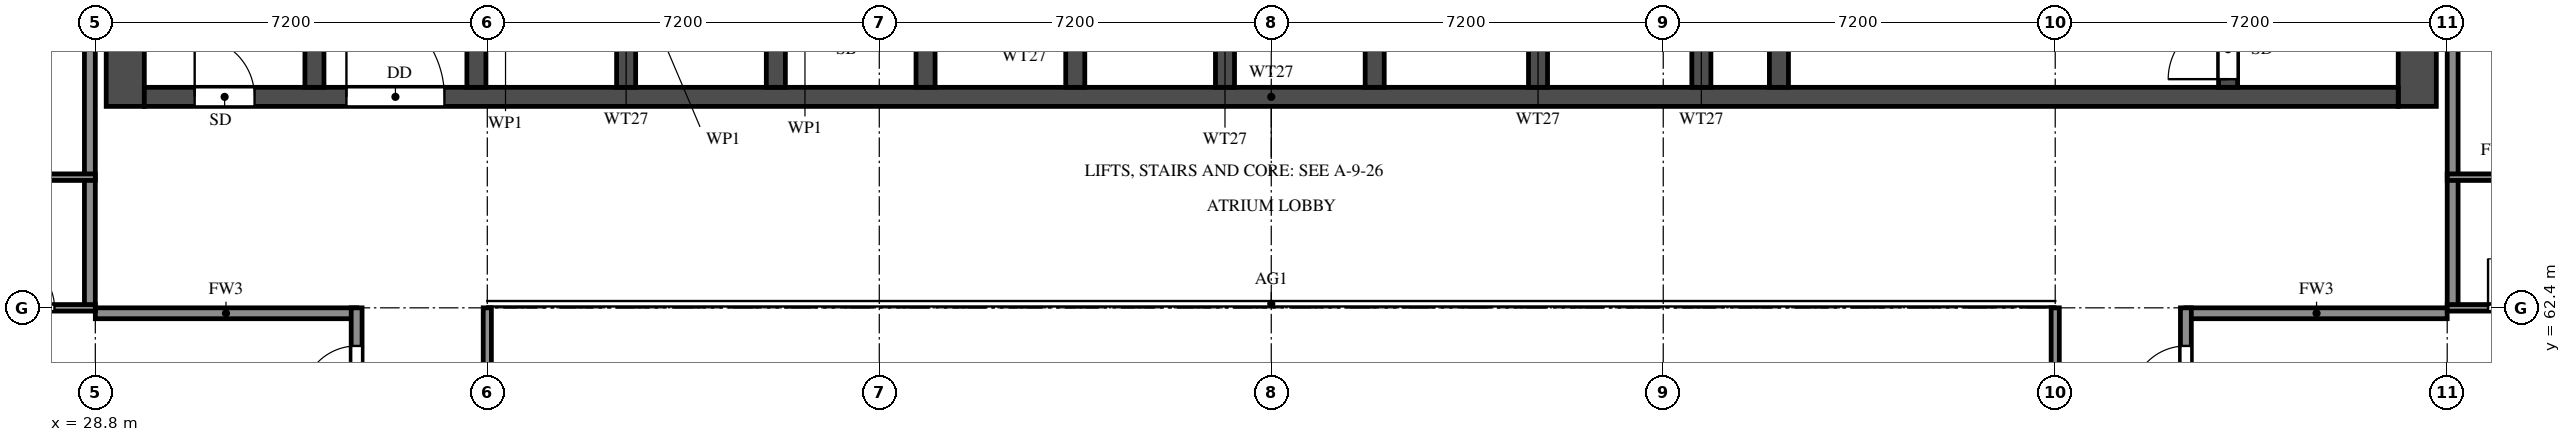
"""IFC4 building model, lengths in metres.
Left out: names, types, materials, properties, quantities, classifications, styles, units other than length and angle.
Written with IfcOpenShell. Run it as: python <this file> out.ifc"""

import sys

from ifc_helpers import new_model, si_unit, direction, frame, frame_2d, origin, place, context, subcontext, project, spatial, rectangle, extrude, element, fill, save


model = new_model("IFC4")
c1 = context("Model", 3, precision=1e-05, world=origin(), true_north=direction((0.0, 1.0)))
c2 = subcontext(c1, "Body", "Model", "MODEL_VIEW")
j1 = project(units=[si_unit("LENGTHUNIT", "METRE"), si_unit("PLANEANGLEUNIT", "RADIAN")], contexts=[c1])
p1 = place(None, origin())
s1 = spatial("IfcSite", under=j1, at=p1, CompositionType="ELEMENT")
p2 = place(p1, origin())
s2 = spatial("IfcBuilding", under=s1, at=p2, CompositionType="ELEMENT")
p3 = place(p2, frame((0.0, 0.0, 199.0)))
s3 = spatial("IfcBuildingStorey", under=s2, at=p3, CompositionType="ELEMENT", Elevation=199.0)
for number, where, z_axis, x_axis in (
    (1, (29.35, 66.1, 0.0), (0.0, 0.0, 1.0), (0.0, 1.0, 0.0)),
    (2, (71.45, 66.1, 0.0), (0.0, 0.0, 1.0), (0.0, 1.0, 0.0)),
):
    element("IfcWall", number, at=place(p3, frame(where, z_axis=z_axis, x_axis=x_axis)), inside=s3, PredefinedType="SHEAR", context=c2, shape_type="SweptSolid", body=[
        extrude(rectangle(XDim=11.9, YDim=0.7, at=frame_2d((5.95, 0.0))), origin(), (0.0, 0.0, 1.0), 3.2),
    ])
p4 = place(p3, frame((29.7, 66.275, 0.0), z_axis=(0.0, 0.0, 1.0), x_axis=(1.0, 0.0, 0.0)))
e3 = element("IfcWall", 3, at=p4, inside=s3, PredefinedType="SHEAR", context=c2, shape_type="SweptSolid", body=[
    extrude(rectangle(XDim=41.4, YDim=0.35, at=frame_2d((20.7, 0.0))), origin(), (0.0, 0.0, 1.0), 3.2),
])
p5 = place(p4, frame((0.925, 0.0, 0.0)))
e4 = element("IfcOpeningElement", 4, at=p5, cuts=e3, PredefinedType="OPENING", context=c2, shape_type="SweptSolid", body=[
    extrude(rectangle(XDim=1.1, YDim=2.1, at=frame_2d((0.55, 1.05))), frame((0.0, 0.185, 0.0), z_axis=(0.0, -1.0, 0.0), x_axis=(1.0, 0.0, 0.0)), (0.0, 0.0, 1.0), 0.37),
])
p6 = place(p4, frame((3.712, 0.0, 0.0)))
e5 = element("IfcOpeningElement", 5, at=p6, cuts=e3, PredefinedType="OPENING", context=c2, shape_type="SweptSolid", body=[
    extrude(rectangle(XDim=1.8, YDim=2.1, at=frame_2d((0.9, 1.05))), frame((0.0, 0.185, 0.0), z_axis=(0.0, -1.0, 0.0), x_axis=(1.0, 0.0, 0.0)), (0.0, 0.0, 1.0), 0.37),
])
p7 = place(p3, frame((32.825, 66.45, 0.0), z_axis=(0.0, 0.0, 1.0), x_axis=(0.0, 1.0, 0.0)))
e6 = element("IfcWall", 6, at=p7, inside=s3, PredefinedType="SHEAR", context=c2, shape_type="SweptSolid", body=[
    extrude(rectangle(XDim=10.85, YDim=0.35, at=frame_2d((5.425, 0.0))), origin(), (0.0, 0.0, 1.0), 3.2),
])
p8 = place(p3, frame((67.975, 66.45, 0.0), z_axis=(0.0, 0.0, 1.0), x_axis=(0.0, 1.0, 0.0)))
e7 = element("IfcWall", 7, at=p8, inside=s3, PredefinedType="SHEAR", context=c2, shape_type="SweptSolid", body=[
    extrude(rectangle(XDim=10.85, YDim=0.35, at=frame_2d((5.425, 0.0))), origin(), (0.0, 0.0, 1.0), 3.2),
])
p9 = place(p8, frame((0.15, 0.0, 0.0)))
e8 = element("IfcOpeningElement", 8, at=p9, cuts=e7, PredefinedType="OPENING", context=c2, shape_type="SweptSolid", body=[
    extrude(rectangle(XDim=1.1, YDim=2.1, at=frame_2d((0.55, 1.05))), frame((0.0, 0.185, 0.0), z_axis=(0.0, -1.0, 0.0), x_axis=(1.0, 0.0, 0.0)), (0.0, 0.0, 1.0), 0.37),
])
p10 = place(p3, frame((59.725, 66.45, 0.0), z_axis=(0.0, 0.0, 1.0), x_axis=(0.0, 1.0, 0.0)))
e9 = element("IfcWall", 9, at=p10, inside=s3, PredefinedType="SHEAR", context=c2, shape_type="SweptSolid", body=[
    extrude(rectangle(XDim=6.125, YDim=0.35, at=frame_2d((3.062, 0.0))), origin(), (0.0, 0.0, 1.0), 3.2),
])
p11 = place(p10, frame((3.85, 0.0, 0.0)))
e10 = element("IfcOpeningElement", 10, at=p11, cuts=e9, PredefinedType="OPENING", context=c2, shape_type="SweptSolid", body=[
    extrude(rectangle(XDim=1.2, YDim=2.1, at=frame_2d((0.6, 1.05))), frame((0.0, 0.185, 0.0), z_axis=(0.0, -1.0, 0.0), x_axis=(1.0, 0.0, 0.0)), (0.0, 0.0, 1.0), 0.37),
])
for number, where, z_axis, x_axis in (
    (11, (35.8, 66.45, 0.0), (0.0, 0.0, 1.0), (0.0, 1.0, 0.0)),
    (12, (38.55, 66.45, 0.0), (0.0, 0.0, 1.0), (0.0, 1.0, 0.0)),
    (13, (41.3, 66.45, 0.0), (0.0, 0.0, 1.0), (0.0, 1.0, 0.0)),
    (14, (44.05, 66.45, 0.0), (0.0, 0.0, 1.0), (0.0, 1.0, 0.0)),
    (15, (46.8, 66.45, 0.0), (0.0, 0.0, 1.0), (0.0, 1.0, 0.0)),
    (16, (49.55, 66.45, 0.0), (0.0, 0.0, 1.0), (0.0, 1.0, 0.0)),
    (17, (52.3, 66.45, 0.0), (0.0, 0.0, 1.0), (0.0, 1.0, 0.0)),
    (18, (55.3, 66.45, 0.0), (0.0, 0.0, 1.0), (0.0, 1.0, 0.0)),
    (19, (58.3, 66.45, 0.0), (0.0, 0.0, 1.0), (0.0, 1.0, 0.0)),
):
    element("IfcWall", number, at=place(p3, frame(where, z_axis=z_axis, x_axis=x_axis)), inside=s3, PredefinedType="SHEAR", context=c2, shape_type="SweptSolid", body=[
        extrude(rectangle(XDim=2.425, YDim=0.35, at=frame_2d((1.212, 0.0))), origin(), (0.0, 0.0, 1.0), 3.2),
    ])
for number, where, z_axis, x_axis in (
    (20, (28.8, 62.3, 0.0), (0.0, 0.0, 1.0), (1.0, 0.0, 0.0)),
    (21, (67.2, 62.3, 0.0), (0.0, 0.0, 1.0), (1.0, 0.0, 0.0)),
):
    element("IfcWall", number, at=place(p3, frame(where, z_axis=z_axis, x_axis=x_axis)), inside=s3, PredefinedType="SOLIDWALL", context=c2, shape_type="SweptSolid", body=[
        extrude(rectangle(XDim=4.8, YDim=0.2, at=frame_2d((2.4, 0.0))), origin(), (0.0, 0.0, 1.0), 3.2),
    ])
p12 = place(p3, frame((28.7, 62.4, 0.0), z_axis=(0.0, 0.0, 1.0), x_axis=(0.0, 1.0, 0.0)))
e22 = element("IfcWall", 22, at=p12, inside=s3, PredefinedType="SOLIDWALL", context=c2, shape_type="SweptSolid", body=[
    extrude(rectangle(XDim=15.6, YDim=0.2, at=frame_2d((7.8, 0.0))), origin(), (0.0, 0.0, 1.0), 3.2),
])
p13 = place(p3, frame((33.6, 45.6, 0.0), z_axis=(0.0, 0.0, 1.0), x_axis=(0.0, 1.0, 0.0)))
e23 = element("IfcWall", 23, at=p13, inside=s3, PredefinedType="SOLIDWALL", context=c2, shape_type="SweptSolid", body=[
    extrude(rectangle(XDim=16.8, YDim=0.2, at=frame_2d((8.4, 0.0))), origin(), (0.0, 0.0, 1.0), 3.2),
])
p14 = place(p13, frame((0.7, 0.0, 0.0)))
e24 = element("IfcOpeningElement", 24, at=p14, cuts=e23, PredefinedType="OPENING", context=c2, shape_type="SweptSolid", body=[
    extrude(rectangle(XDim=1.0, YDim=2.1, at=frame_2d((0.5, 1.05))), frame((0.0, 0.11, 0.0), z_axis=(0.0, -1.0, 0.0), x_axis=(1.0, 0.0, 0.0)), (0.0, 0.0, 1.0), 0.22),
])
p15 = place(p13, frame((8.3, 0.0, 0.0)))
e25 = element("IfcOpeningElement", 25, at=p15, cuts=e23, PredefinedType="OPENING", context=c2, shape_type="SweptSolid", body=[
    extrude(rectangle(XDim=1.0, YDim=2.1, at=frame_2d((0.5, 1.05))), frame((0.0, 0.11, 0.0), z_axis=(0.0, -1.0, 0.0), x_axis=(1.0, 0.0, 0.0)), (0.0, 0.0, 1.0), 0.22),
])
p16 = place(p13, frame((15.1, 0.0, 0.0)))
e26 = element("IfcOpeningElement", 26, at=p16, cuts=e23, PredefinedType="OPENING", context=c2, shape_type="SweptSolid", body=[
    extrude(rectangle(XDim=1.0, YDim=2.1, at=frame_2d((0.5, 1.05))), frame((0.0, 0.11, 0.0), z_axis=(0.0, -1.0, 0.0), x_axis=(1.0, 0.0, 0.0)), (0.0, 0.0, 1.0), 0.22),
])
p17 = place(p3, frame((67.2, 60.0, 0.0), z_axis=(0.0, 0.0, 1.0), x_axis=(0.0, 1.0, 0.0)))
e27 = element("IfcWall", 27, at=p17, inside=s3, PredefinedType="SOLIDWALL", context=c2, shape_type="SweptSolid", body=[
    extrude(rectangle(XDim=2.4, YDim=0.2, at=frame_2d((1.2, 0.0))), origin(), (0.0, 0.0, 1.0), 3.2),
])
p18 = place(p17, frame((0.7, 0.0, 0.0)))
e28 = element("IfcOpeningElement", 28, at=p18, cuts=e27, PredefinedType="OPENING", context=c2, shape_type="SweptSolid", body=[
    extrude(rectangle(XDim=1.0, YDim=2.1, at=frame_2d((0.5, 1.05))), frame((0.0, 0.11, 0.0), z_axis=(0.0, -1.0, 0.0), x_axis=(1.0, 0.0, 0.0)), (0.0, 0.0, 1.0), 0.22),
])
p19 = place(p3, frame((72.1, 62.4, 0.0), z_axis=(0.0, 0.0, 1.0), x_axis=(0.0, 1.0, 0.0)))
e29 = element("IfcWall", 29, at=p19, inside=s3, PredefinedType="SOLIDWALL", context=c2, shape_type="SweptSolid", body=[
    extrude(rectangle(XDim=15.6, YDim=0.2, at=frame_2d((7.8, 0.0))), origin(), (0.0, 0.0, 1.0), 3.2),
])
p20 = place(p3, frame((26.4, 62.4, 0.0), z_axis=(0.0, 0.0, 1.0), x_axis=(1.0, 0.0, 0.0)))
e30 = element("IfcWall", 30, at=p20, inside=s3, PredefinedType="PARTITIONING", context=c2, shape_type="SweptSolid", body=[
    extrude(rectangle(XDim=2.4, YDim=0.12, at=frame_2d((1.2, 0.0))), origin(), (0.0, 0.0, 1.0), 3.2),
])
p21 = place(p20, frame((0.75, 0.0, 0.0)))
e31 = element("IfcOpeningElement", 31, at=p21, cuts=e30, PredefinedType="OPENING", context=c2, shape_type="SweptSolid", body=[
    extrude(rectangle(XDim=0.9, YDim=2.1, at=frame_2d((0.45, 1.05))), frame((0.0, 0.07, 0.0), z_axis=(0.0, -1.0, 0.0), x_axis=(1.0, 0.0, 0.0)), (0.0, 0.0, 1.0), 0.14),
])
p22 = place(p3, frame((72.0, 62.4, 0.0), z_axis=(0.0, 0.0, 1.0), x_axis=(1.0, 0.0, 0.0)))
e32 = element("IfcWall", 32, at=p22, inside=s3, PredefinedType="PARTITIONING", context=c2, shape_type="SweptSolid", body=[
    extrude(rectangle(XDim=2.4, YDim=0.12, at=frame_2d((1.2, 0.0))), origin(), (0.0, 0.0, 1.0), 3.2),
])
p23 = place(p22, frame((0.75, 0.0, 0.0)))
e33 = element("IfcOpeningElement", 33, at=p23, cuts=e32, PredefinedType="OPENING", context=c2, shape_type="SweptSolid", body=[
    extrude(rectangle(XDim=0.9, YDim=2.1, at=frame_2d((0.45, 1.05))), frame((0.0, 0.07, 0.0), z_axis=(0.0, -1.0, 0.0), x_axis=(1.0, 0.0, 0.0)), (0.0, 0.0, 1.0), 0.14),
])
p24 = place(p3, frame((23.7, 64.8, 0.0), z_axis=(0.0, 0.0, 1.0), x_axis=(1.0, 0.0, 0.0)))
e34 = element("IfcWall", 34, at=p24, inside=s3, PredefinedType="PARTITIONING", context=c2, shape_type="SweptSolid", body=[
    extrude(rectangle(XDim=5.1, YDim=0.12, at=frame_2d((2.55, 0.0))), origin(), (0.0, 0.0, 1.0), 3.2),
])
p25 = place(p24, frame((2.1, 0.0, 0.0)))
e35 = element("IfcOpeningElement", 35, at=p25, cuts=e34, PredefinedType="OPENING", context=c2, shape_type="SweptSolid", body=[
    extrude(rectangle(XDim=0.9, YDim=2.1, at=frame_2d((0.45, 1.05))), frame((0.0, 0.07, 0.0), z_axis=(0.0, -1.0, 0.0), x_axis=(1.0, 0.0, 0.0)), (0.0, 0.0, 1.0), 0.14),
])
p26 = place(p3, frame((72.0, 64.8, 0.0), z_axis=(0.0, 0.0, 1.0), x_axis=(1.0, 0.0, 0.0)))
e36 = element("IfcWall", 36, at=p26, inside=s3, PredefinedType="PARTITIONING", context=c2, shape_type="SweptSolid", body=[
    extrude(rectangle(XDim=5.1, YDim=0.12, at=frame_2d((2.55, 0.0))), origin(), (0.0, 0.0, 1.0), 3.2),
])
p27 = place(p26, frame((2.1, 0.0, 0.0)))
e37 = element("IfcOpeningElement", 37, at=p27, cuts=e36, PredefinedType="OPENING", context=c2, shape_type="SweptSolid", body=[
    extrude(rectangle(XDim=0.9, YDim=2.1, at=frame_2d((0.45, 1.05))), frame((0.0, 0.07, 0.0), z_axis=(0.0, -1.0, 0.0), x_axis=(1.0, 0.0, 0.0)), (0.0, 0.0, 1.0), 0.14),
])
for number, where, z_axis, x_axis in (
    (38, (36.0, 48.0, 0.0), (0.0, 0.0, 1.0), (0.0, 1.0, 0.0)),
    (39, (64.8, 48.0, 0.0), (0.0, 0.0, 1.0), (0.0, 1.0, 0.0)),
):
    element("IfcWall", number, at=place(p3, frame(where, z_axis=z_axis, x_axis=x_axis)), inside=s3, PredefinedType="SOLIDWALL", context=c2, shape_type="SweptSolid", body=[
        extrude(rectangle(XDim=14.4, YDim=0.15, at=frame_2d((7.2, 0.0))), origin(), (0.0, 0.0, 1.0), 2.3),
    ])
p28 = place(p5, origin())
e40 = element("IfcDoor", 40, at=p28, inside=s3, OperationType="SINGLE_SWING_LEFT", PredefinedType="DOOR", context=c2, shape_type="SweptSolid", body=[
    extrude(rectangle(XDim=1.1, YDim=2.1, at=frame_2d((0.55, 1.05))), frame((0.0, 0.025, 0.0), z_axis=(0.0, -1.0, 0.0), x_axis=(1.0, 0.0, 0.0)), (0.0, 0.0, 1.0), 0.05),
])
fill(e4, e40)
p29 = place(p9, origin())
e41 = element("IfcDoor", 41, at=p29, inside=s3, OperationType="SINGLE_SWING_LEFT", PredefinedType="DOOR", context=c2, shape_type="SweptSolid", body=[
    extrude(rectangle(XDim=1.1, YDim=2.1, at=frame_2d((0.55, 1.05))), frame((0.0, 0.025, 0.0), z_axis=(0.0, -1.0, 0.0), x_axis=(1.0, 0.0, 0.0)), (0.0, 0.0, 1.0), 0.05),
])
fill(e8, e41)
p30 = place(p6, origin())
e42 = element("IfcDoor", 42, at=p30, inside=s3, OperationType="DOUBLE_DOOR_SINGLE_SWING", PredefinedType="DOOR", context=c2, shape_type="SweptSolid", body=[
    extrude(rectangle(XDim=1.8, YDim=2.1, at=frame_2d((0.9, 1.05))), frame((0.0, 0.025, 0.0), z_axis=(0.0, -1.0, 0.0), x_axis=(1.0, 0.0, 0.0)), (0.0, 0.0, 1.0), 0.05),
])
fill(e5, e42)
p31 = place(p21, origin())
e43 = element("IfcDoor", 43, at=p31, inside=s3, OperationType="SINGLE_SWING_LEFT", PredefinedType="DOOR", context=c2, shape_type="SweptSolid", body=[
    extrude(rectangle(XDim=0.9, YDim=2.1, at=frame_2d((0.45, 1.05))), frame((0.0, 0.025, 0.0), z_axis=(0.0, -1.0, 0.0), x_axis=(1.0, 0.0, 0.0)), (0.0, 0.0, 1.0), 0.05),
])
fill(e31, e43)
p32 = place(p16, origin())
e44 = element("IfcDoor", 44, at=p32, inside=s3, OperationType="SINGLE_SWING_LEFT", PredefinedType="DOOR", context=c2, shape_type="SweptSolid", body=[
    extrude(rectangle(XDim=1.0, YDim=2.1, at=frame_2d((0.5, 1.05))), frame((0.0, 0.025, 0.0), z_axis=(0.0, -1.0, 0.0), x_axis=(1.0, 0.0, 0.0)), (0.0, 0.0, 1.0), 0.05),
])
fill(e26, e44)
p33 = place(p23, origin())
e45 = element("IfcDoor", 45, at=p33, inside=s3, OperationType="SINGLE_SWING_RIGHT", PredefinedType="DOOR", context=c2, shape_type="SweptSolid", body=[
    extrude(rectangle(XDim=0.9, YDim=2.1, at=frame_2d((0.45, 1.05))), frame((0.0, 0.025, 0.0), z_axis=(0.0, -1.0, 0.0), x_axis=(1.0, 0.0, 0.0)), (0.0, 0.0, 1.0), 0.05),
])
fill(e33, e45)
p34 = place(p18, origin())
e46 = element("IfcDoor", 46, at=p34, inside=s3, OperationType="SINGLE_SWING_LEFT", PredefinedType="DOOR", context=c2, shape_type="SweptSolid", body=[
    extrude(rectangle(XDim=1.0, YDim=2.1, at=frame_2d((0.5, 1.05))), frame((0.0, 0.025, 0.0), z_axis=(0.0, -1.0, 0.0), x_axis=(1.0, 0.0, 0.0)), (0.0, 0.0, 1.0), 0.05),
])
fill(e28, e46)
save(model, sys.argv[1])
